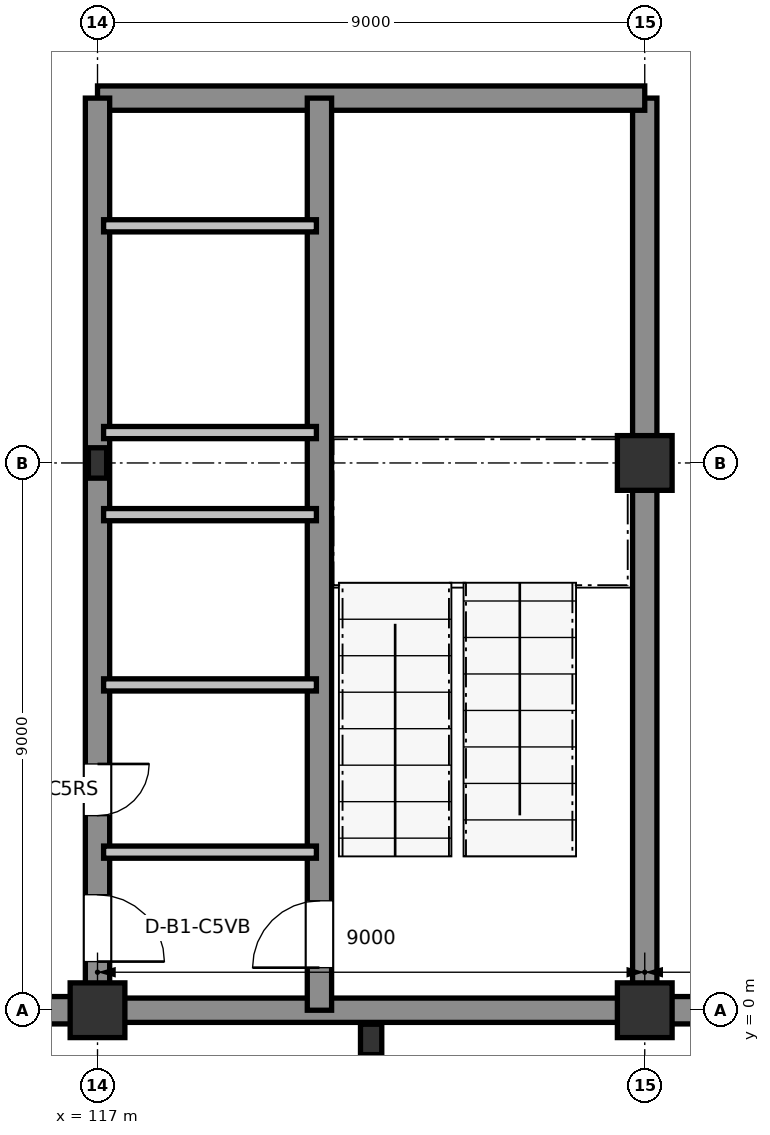
"""IFC4 building model, lengths in metres.
Left out: names, types, materials, properties, quantities, classifications, styles, units other than length and angle.
Written with IfcOpenShell. Run it as: python <this file> out.ifc"""

import sys

from ifc_helpers import new_model, si_unit, direction, frame, frame_2d, origin, origin_2d, place, context, subcontext, project, spatial, rectangle, i_section, extrude, element, fill, save


model = new_model("IFC4")
c1 = context("Model", 3, precision=1e-05, world=origin(), true_north=direction((0.0, 1.0)))
c2 = subcontext(c1, "Body", "Model", "MODEL_VIEW")
j1 = project(units=[si_unit("LENGTHUNIT", "METRE"), si_unit("PLANEANGLEUNIT", "RADIAN")], contexts=[c1])
p1 = place(None, origin())
s1 = spatial("IfcSite", under=j1, at=p1, CompositionType="ELEMENT")
p2 = place(p1, origin())
s2 = spatial("IfcBuilding", under=s1, at=p2, CompositionType="ELEMENT")
p3 = place(p2, frame((0.0, 0.0, -4.8)))
s3 = spatial("IfcBuildingStorey", under=s2, at=p3, CompositionType="ELEMENT", Elevation=-4.8)
p4 = place(p3, frame((121.5, -0.48, 0.0), z_axis=(0.0, 0.0, 1.0), x_axis=(1.0, 0.0, 0.0)))
e1 = element("IfcColumn", 1, at=p4, inside=s3, PredefinedType="PILASTER", context=c2, shape_type="SweptSolid", body=[
    extrude(rectangle(XDim=0.35, YDim=0.5, at=origin_2d()), origin(), (0.0, 0.0, 1.0), 4.8),
])
p5 = place(p3, frame((117.0, 0.0, 0.0), z_axis=(0.0, 0.0, 1.0), x_axis=(1.0, 0.0, 0.0)))
e2 = element("IfcColumn", 2, at=p5, inside=s3, PredefinedType="COLUMN", context=c2, shape_type="SweptSolid", body=[
    extrude(rectangle(XDim=0.9, YDim=0.9, at=origin_2d()), origin(), (0.0, 0.0, 1.0), 4.8),
])
p6 = place(p3, frame((117.0, 9.0, 0.0), z_axis=(0.0, 0.0, 1.0), x_axis=(1.0, 0.0, 0.0)))
e3 = element("IfcColumn", 3, at=p6, inside=s3, PredefinedType="COLUMN", context=c2, shape_type="SweptSolid", body=[
    extrude(i_section(OverallWidth=0.3, OverallDepth=0.5, WebThickness=0.014, FlangeThickness=0.028, at=origin_2d()), origin(), (0.0, 0.0, 1.0), 4.8),
])
for number, where, z_axis, x_axis in (
    (4, (126.0, 0.0, 0.0), (0.0, 0.0, 1.0), (1.0, 0.0, 0.0)),
    (5, (126.0, 9.0, 0.0), (0.0, 0.0, 1.0), (1.0, 0.0, 0.0)),
):
    element("IfcColumn", number, at=place(p3, frame(where, z_axis=z_axis, x_axis=x_axis)), inside=s3, PredefinedType="COLUMN", context=c2, shape_type="SweptSolid", body=[
        extrude(rectangle(XDim=0.9, YDim=0.9, at=origin_2d()), origin(), (0.0, 0.0, 1.0), 4.8),
    ])
for number, where, z_axis, x_axis in (
    (6, (108.0, 0.0, 0.0), (0.0, 0.0, 1.0), (1.0, 0.0, 0.0)),
    (7, (126.0, 0.0, 0.0), (0.0, 0.0, 1.0), (1.0, 0.0, 0.0)),
):
    element("IfcWall", number, at=place(p3, frame(where, z_axis=z_axis, x_axis=x_axis)), inside=s3, PredefinedType="USERDEFINED", context=c2, shape_type="SweptSolid", body=[
        extrude(rectangle(XDim=9.0, YDim=0.45, at=frame_2d((4.5, 0.0))), origin(), (0.0, 0.0, 1.0), 4.55),
    ])
p7 = place(p3, frame((117.0, 0.0, 0.0), z_axis=(0.0, 0.0, 1.0), x_axis=(1.0, 0.0, 0.0)))
e8 = element("IfcWall", 8, at=p7, inside=s3, PredefinedType="SHEAR", context=c2, shape_type="SweptSolid", body=[
    extrude(rectangle(XDim=9.0, YDim=0.4, at=frame_2d((4.5, 0.0))), origin(), (0.0, 0.0, 1.0), 4.55),
])
p8 = place(p3, frame((126.0, 0.0, 0.0), z_axis=(0.0, 0.0, 1.0), x_axis=(0.0, 1.0, 0.0)))
e9 = element("IfcWall", 9, at=p8, inside=s3, PredefinedType="SHEAR", context=c2, shape_type="SweptSolid", body=[
    extrude(rectangle(XDim=15.0, YDim=0.4, at=frame_2d((7.5, 0.0))), origin(), (0.0, 0.0, 1.0), 4.55),
])
p9 = place(p3, frame((126.0, 15.0, 0.0), z_axis=(0.0, 0.0, 1.0), x_axis=(-1.0, 0.0, 0.0)))
e10 = element("IfcWall", 10, at=p9, inside=s3, PredefinedType="SHEAR", context=c2, shape_type="SweptSolid", body=[
    extrude(rectangle(XDim=9.0, YDim=0.4, at=frame_2d((4.5, 0.0))), origin(), (0.0, 0.0, 1.0), 4.55),
])
p10 = place(p3, frame((117.0, 15.0, 0.0), z_axis=(0.0, 0.0, 1.0), x_axis=(0.0, -1.0, 0.0)))
e11 = element("IfcWall", 11, at=p10, inside=s3, PredefinedType="SHEAR", context=c2, shape_type="SweptSolid", body=[
    extrude(rectangle(XDim=15.0, YDim=0.4, at=frame_2d((7.5, 0.0))), origin(), (0.0, 0.0, 1.0), 4.55),
])
p11 = place(p10, frame((13.1, 0.0, 0.0)))
e12 = element("IfcOpeningElement", 12, at=p11, cuts=e11, PredefinedType="OPENING", context=c2, shape_type="SweptSolid", body=[
    extrude(rectangle(XDim=1.1, YDim=2.16, at=frame_2d((0.55, 1.08))), frame((0.0, 0.21, 0.0), z_axis=(0.0, -1.0, 0.0), x_axis=(1.0, 0.0, 0.0)), (0.0, 0.0, 1.0), 0.42),
])
p12 = place(p10, frame((10.95, 0.0, 0.0)))
e13 = element("IfcOpeningElement", 13, at=p12, cuts=e11, PredefinedType="OPENING", context=c2, shape_type="SweptSolid", body=[
    extrude(rectangle(XDim=0.85, YDim=2.1, at=frame_2d((0.425, 1.05))), frame((0.0, 0.21, 0.0), z_axis=(0.0, -1.0, 0.0), x_axis=(1.0, 0.0, 0.0)), (0.0, 0.0, 1.0), 0.42),
])
p13 = place(p3, frame((120.65, 0.0, 0.0), z_axis=(0.0, 0.0, 1.0), x_axis=(0.0, 1.0, 0.0)))
e14 = element("IfcWall", 14, at=p13, inside=s3, PredefinedType="SHEAR", context=c2, shape_type="SweptSolid", body=[
    extrude(rectangle(XDim=15.0, YDim=0.4, at=frame_2d((7.5, 0.0))), origin(), (0.0, 0.0, 1.0), 4.55),
])
p14 = place(p13, frame((0.7, 0.0, 0.0)))
e15 = element("IfcOpeningElement", 15, at=p14, cuts=e14, PredefinedType="OPENING", context=c2, shape_type="SweptSolid", body=[
    extrude(rectangle(XDim=1.1, YDim=2.16, at=frame_2d((0.55, 1.08))), frame((0.0, 0.21, 0.0), z_axis=(0.0, -1.0, 0.0), x_axis=(1.0, 0.0, 0.0)), (0.0, 0.0, 1.0), 0.42),
])
for number, where, z_axis, x_axis in (
    (16, (117.1, 2.6, 0.0), (0.0, 0.0, 1.0), (1.0, 0.0, 0.0)),
    (17, (117.1, 5.35, 0.0), (0.0, 0.0, 1.0), (1.0, 0.0, 0.0)),
    (18, (117.1, 8.15, 0.0), (0.0, 0.0, 1.0), (1.0, 0.0, 0.0)),
    (19, (117.1, 9.5, 0.0), (0.0, 0.0, 1.0), (1.0, 0.0, 0.0)),
    (20, (117.1, 12.9, 0.0), (0.0, 0.0, 1.0), (1.0, 0.0, 0.0)),
):
    element("IfcWall", number, at=place(p3, frame(where, z_axis=z_axis, x_axis=x_axis)), inside=s3, PredefinedType="PARTITIONING", context=c2, shape_type="SweptSolid", body=[
        extrude(rectangle(XDim=3.5, YDim=0.2, at=frame_2d((1.75, 0.0))), origin(), (0.0, 0.0, 1.0), 4.55),
    ])
p15 = place(p14, origin())
e21 = element("IfcDoor", 21, at=p15, inside=s3, OperationType="SINGLE_SWING_LEFT", PredefinedType="DOOR", context=c2, shape_type="SweptSolid", body=[
    extrude(rectangle(XDim=1.1, YDim=2.16, at=frame_2d((0.55, 1.08))), frame((0.0, 0.025, 0.0), z_axis=(0.0, -1.0, 0.0), x_axis=(1.0, 0.0, 0.0)), (0.0, 0.0, 1.0), 0.05),
])
fill(e15, e21)
p16 = place(p11, origin())
e22 = element("IfcDoor", 22, at=p16, inside=s3, OperationType="SINGLE_SWING_RIGHT", PredefinedType="DOOR", context=c2, shape_type="SweptSolid", body=[
    extrude(rectangle(XDim=1.1, YDim=2.16, at=frame_2d((0.55, 1.08))), frame((0.0, 0.025, 0.0), z_axis=(0.0, -1.0, 0.0), x_axis=(1.0, 0.0, 0.0)), (0.0, 0.0, 1.0), 0.05),
])
fill(e12, e22)
p17 = place(p12, origin())
e23 = element("IfcDoor", 23, at=p17, inside=s3, OperationType="SINGLE_SWING_LEFT", PredefinedType="DOOR", context=c2, shape_type="SweptSolid", body=[
    extrude(rectangle(XDim=0.85, YDim=2.1, at=frame_2d((0.425, 1.05))), frame((0.0, 0.025, 0.0), z_axis=(0.0, -1.0, 0.0), x_axis=(1.0, 0.0, 0.0)), (0.0, 0.0, 1.0), 0.05),
])
fill(e13, e23)
save(model, sys.argv[1])
